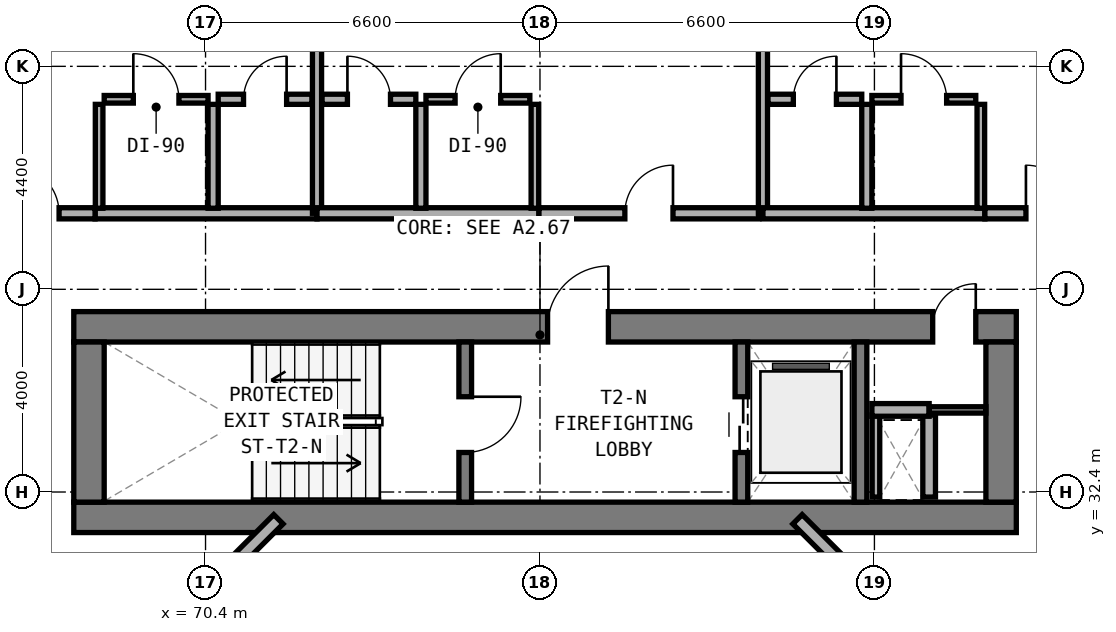
"""IFC4 building model, lengths in metres.
Left out: names, types, materials, properties, quantities, classifications, styles, units other than length and angle.
Written with IfcOpenShell. Run it as: python <this file> out.ifc"""

import sys

from ifc_helpers import new_model, si_unit, direction, frame, frame_2d, origin, place, context, subcontext, project, spatial, rectangle, extrude, element, fill, save


model = new_model("IFC4")
c1 = context("Model", 3, precision=1e-05, world=origin(), true_north=direction((0.0, 1.0)))
c2 = subcontext(c1, "Body", "Model", "MODEL_VIEW")
j1 = project(units=[si_unit("LENGTHUNIT", "METRE"), si_unit("PLANEANGLEUNIT", "RADIAN")], contexts=[c1])
p1 = place(None, origin())
s1 = spatial("IfcSite", under=j1, at=p1, CompositionType="ELEMENT")
p2 = place(p1, origin())
s2 = spatial("IfcBuilding", under=s1, at=p2, CompositionType="ELEMENT")
p3 = place(p2, frame((0.0, 0.0, 31.0)))
s3 = spatial("IfcBuildingStorey", under=s2, at=p3, CompositionType="ELEMENT", Elevation=31.0)
p4 = place(p3, frame((67.8, 31.9, 0.0), z_axis=(0.0, 0.0, 1.0), x_axis=(1.0, 0.0, 0.0)))
e1 = element("IfcWall", 1, at=p4, inside=s3, PredefinedType="SHEAR", context=c2, shape_type="SweptSolid", body=[
    extrude(rectangle(XDim=18.6, YDim=0.6, at=frame_2d((9.3, 0.0))), origin(), (0.0, 0.0, 1.0), 3.5),
])
p5 = place(p3, frame((67.8, 35.66, 0.0), z_axis=(0.0, 0.0, 1.0), x_axis=(1.0, 0.0, 0.0)))
e2 = element("IfcWall", 2, at=p5, inside=s3, PredefinedType="SHEAR", context=c2, shape_type="SweptSolid", body=[
    extrude(rectangle(XDim=18.6, YDim=0.6, at=frame_2d((9.3, 0.0))), origin(), (0.0, 0.0, 1.0), 3.5),
])
p6 = place(p5, frame((9.35, 0.0, 0.0)))
e3 = element("IfcOpeningElement", 3, at=p6, cuts=e2, PredefinedType="OPENING", context=c2, shape_type="SweptSolid", body=[
    extrude(rectangle(XDim=1.2, YDim=2.15, at=frame_2d((0.6, 1.075))), frame((0.0, 0.31, 0.0), z_axis=(0.0, -1.0, 0.0), x_axis=(1.0, 0.0, 0.0)), (0.0, 0.0, 1.0), 0.62),
])
p7 = place(p5, frame((16.95, 0.0, 0.0)))
e4 = element("IfcOpeningElement", 4, at=p7, cuts=e2, PredefinedType="OPENING", context=c2, shape_type="SweptSolid", body=[
    extrude(rectangle(XDim=0.85, YDim=2.1, at=frame_2d((0.425, 1.05))), frame((0.0, 0.31, 0.0), z_axis=(0.0, -1.0, 0.0), x_axis=(1.0, 0.0, 0.0)), (0.0, 0.0, 1.0), 0.62),
])
for number, where, z_axis, x_axis in (
    (5, (68.1, 32.2, 0.0), (0.0, 0.0, 1.0), (0.0, 1.0, 0.0)),
    (6, (86.1, 32.2, 0.0), (0.0, 0.0, 1.0), (0.0, 1.0, 0.0)),
):
    element("IfcWall", number, at=place(p3, frame(where, z_axis=z_axis, x_axis=x_axis)), inside=s3, PredefinedType="SHEAR", context=c2, shape_type="SweptSolid", body=[
        extrude(rectangle(XDim=3.16, YDim=0.6, at=frame_2d((1.58, 0.0))), origin(), (0.0, 0.0, 1.0), 3.5),
    ])
p8 = place(p3, frame((75.525, 32.2, 0.0), z_axis=(0.0, 0.0, 1.0), x_axis=(0.0, 1.0, 0.0)))
e7 = element("IfcWall", 7, at=p8, inside=s3, PredefinedType="STANDARD", context=c2, shape_type="SweptSolid", body=[
    extrude(rectangle(XDim=3.16, YDim=0.25, at=frame_2d((1.58, 0.0))), origin(), (0.0, 0.0, 1.0), 3.25),
])
p9 = place(p8, frame((0.98, 0.0, 0.0)))
e8 = element("IfcOpeningElement", 8, at=p9, cuts=e7, PredefinedType="OPENING", context=c2, shape_type="SweptSolid", body=[
    extrude(rectangle(XDim=1.1, YDim=2.15, at=frame_2d((0.55, 1.075))), frame((0.0, 0.135, 0.0), z_axis=(0.0, -1.0, 0.0), x_axis=(1.0, 0.0, 0.0)), (0.0, 0.0, 1.0), 0.27),
])
p10 = place(p3, frame((80.975, 32.2, 0.0), z_axis=(0.0, 0.0, 1.0), x_axis=(0.0, 1.0, 0.0)))
e9 = element("IfcWall", 9, at=p10, inside=s3, PredefinedType="STANDARD", context=c2, shape_type="SweptSolid", body=[
    extrude(rectangle(XDim=3.16, YDim=0.25, at=frame_2d((1.58, 0.0))), origin(), (0.0, 0.0, 1.0), 3.25),
])
p11 = place(p10, frame((0.98, 0.0, 0.0)))
e10 = element("IfcOpeningElement", 10, at=p11, cuts=e9, PredefinedType="OPENING", context=c2, shape_type="SweptSolid", body=[
    extrude(rectangle(XDim=1.1, YDim=2.15, at=frame_2d((0.55, 1.075))), frame((0.0, 0.135, 0.0), z_axis=(0.0, -1.0, 0.0), x_axis=(1.0, 0.0, 0.0)), (0.0, 0.0, 1.0), 0.27),
])
p12 = place(p3, frame((83.325, 32.2, 0.0), z_axis=(0.0, 0.0, 1.0), x_axis=(0.0, 1.0, 0.0)))
e11 = element("IfcWall", 11, at=p12, inside=s3, PredefinedType="STANDARD", context=c2, shape_type="SweptSolid", body=[
    extrude(rectangle(XDim=3.16, YDim=0.25, at=frame_2d((1.58, 0.0))), origin(), (0.0, 0.0, 1.0), 3.25),
])
for number, where, z_axis, x_axis in (
    (12, (83.716, 30.228, 0.0), (0.0, 0.0, 1.0), (-0.707, 0.707, 0.0)),
    (13, (71.838, 31.862, 0.0), (0.0, 0.0, 1.0), (-0.707, -0.707, 0.0)),
):
    element("IfcWall", number, at=place(p3, frame(where, z_axis=z_axis, x_axis=x_axis)), inside=s3, PredefinedType="STANDARD", context=c2, shape_type="SweptSolid", body=[
        extrude(rectangle(XDim=2.311, YDim=0.26, at=frame_2d((1.155, 0.0))), origin(), (0.0, 0.0, 1.0), 3.25),
    ])
p13 = place(p3, frame((83.63, 32.3, 0.0), z_axis=(0.0, 0.0, 1.0), x_axis=(0.0, 1.0, 0.0)))
e14 = element("IfcWall", 14, at=p13, inside=s3, PredefinedType="PARTITIONING", context=c2, shape_type="SweptSolid", body=[
    extrude(rectangle(XDim=1.62, YDim=0.15, at=frame_2d((0.81, 0.0))), origin(), (0.0, 0.0, 1.0), 2.725),
])
p14 = place(p3, frame((84.68, 32.3, 0.0), z_axis=(0.0, 0.0, 1.0), x_axis=(0.0, 1.0, 0.0)))
e15 = element("IfcWall", 15, at=p14, inside=s3, PredefinedType="SOLIDWALL", context=c2, shape_type="SweptSolid", body=[
    extrude(rectangle(XDim=1.62, YDim=0.25, at=frame_2d((0.81, 0.0))), origin(), (0.0, 0.0, 1.0), 3.22),
])
p15 = place(p3, frame((83.55, 34.02, 0.0), z_axis=(0.0, 0.0, 1.0), x_axis=(1.0, 0.0, 0.0)))
e16 = element("IfcWall", 16, at=p15, inside=s3, PredefinedType="SOLIDWALL", context=c2, shape_type="SweptSolid", body=[
    extrude(rectangle(XDim=1.13, YDim=0.25, at=frame_2d((0.565, 0.0))), origin(), (0.0, 0.0, 1.0), 3.22),
])
p16 = place(p3, frame((84.68, 34.02, 0.0), z_axis=(0.0, 0.0, 1.0), x_axis=(1.0, 0.0, 0.0)))
e17 = element("IfcWall", 17, at=p16, inside=s3, PredefinedType="PARTITIONING", context=c2, shape_type="SweptSolid", body=[
    extrude(rectangle(XDim=1.12, YDim=0.125, at=frame_2d((0.56, 0.0))), origin(), (0.0, 0.0, 1.0), 3.22),
])
p17 = place(p3, frame((68.22, 37.9, 0.0), z_axis=(0.0, 0.0, 1.0), x_axis=(1.0, 0.0, 0.0)))
e18 = element("IfcWall", 18, at=p17, inside=s3, PredefinedType="SOLIDWALL", context=c2, shape_type="SweptSolid", body=[
    extrude(rectangle(XDim=4.38, YDim=0.22, at=frame_2d((2.19, 0.0))), origin(), (0.0, 0.0, 1.0), 2.725),
])
p18 = place(p3, frame((65.85, 37.9, 0.0), z_axis=(0.0, 0.0, 1.0), x_axis=(1.0, 0.0, 0.0)))
e19 = element("IfcWall", 19, at=p18, inside=s3, PredefinedType="SOLIDWALL", context=c2, shape_type="SweptSolid", body=[
    extrude(rectangle(XDim=2.37, YDim=0.22, at=frame_2d((1.185, 0.0))), origin(), (0.0, 0.0, 1.0), 3.22),
])
p19 = place(p18, frame((0.71, 0.0, 0.0)))
e20 = element("IfcOpeningElement", 20, at=p19, cuts=e19, PredefinedType="OPENING", context=c2, shape_type="SweptSolid", body=[
    extrude(rectangle(XDim=0.95, YDim=2.1, at=frame_2d((0.475, 1.05))), frame((0.0, 0.12, 0.0), z_axis=(0.0, -1.0, 0.0), x_axis=(1.0, 0.0, 0.0)), (0.0, 0.0, 1.0), 0.24),
])
p20 = place(p3, frame((70.55, 38.0, 0.0), z_axis=(0.0, 0.0, 1.0), x_axis=(0.0, 1.0, 0.0)))
e21 = element("IfcWall", 21, at=p20, inside=s3, PredefinedType="PLUMBINGWALL", context=c2, shape_type="SweptSolid", body=[
    extrude(rectangle(XDim=2.05, YDim=0.2, at=frame_2d((1.025, 0.0))), origin(), (0.0, 0.0, 1.0), 3.22),
])
p21 = place(p3, frame((68.3, 38.0, 0.0), z_axis=(0.0, 0.0, 1.0), x_axis=(0.0, 1.0, 0.0)))
e22 = element("IfcWall", 22, at=p21, inside=s3, PredefinedType="PARTITIONING", context=c2, shape_type="SweptSolid", body=[
    extrude(rectangle(XDim=2.05, YDim=0.15, at=frame_2d((1.025, 0.0))), origin(), (0.0, 0.0, 1.0), 3.22),
])
p22 = place(p3, frame((70.65, 40.15, 0.0), z_axis=(0.0, 0.0, 1.0), x_axis=(1.0, 0.0, 0.0)))
e23 = element("IfcWall", 23, at=p22, inside=s3, PredefinedType="PLUMBINGWALL", context=c2, shape_type="SweptSolid", body=[
    extrude(rectangle(XDim=1.85, YDim=0.2, at=frame_2d((0.925, 0.0))), origin(), (0.0, 0.0, 1.0), 3.22),
])
p23 = place(p22, frame((0.5, 0.0, 0.0)))
e24 = element("IfcOpeningElement", 24, at=p23, cuts=e23, PredefinedType="OPENING", context=c2, shape_type="SweptSolid", body=[
    extrude(rectangle(XDim=0.85, YDim=2.1, at=frame_2d((0.425, 1.05))), frame((0.0, 0.11, 0.0), z_axis=(0.0, -1.0, 0.0), x_axis=(1.0, 0.0, 0.0)), (0.0, 0.0, 1.0), 0.22),
])
p24 = place(p3, frame((68.4, 40.15, 0.0), z_axis=(0.0, 0.0, 1.0), x_axis=(1.0, 0.0, 0.0)))
e25 = element("IfcWall", 25, at=p24, inside=s3, PredefinedType="PARTITIONING", context=c2, shape_type="SweptSolid", body=[
    extrude(rectangle(XDim=2.05, YDim=0.15, at=frame_2d((1.025, 0.0))), origin(), (0.0, 0.0, 1.0), 3.22),
])
p25 = place(p24, frame((0.575, 0.0, 0.0)))
e26 = element("IfcOpeningElement", 26, at=p25, cuts=e25, PredefinedType="OPENING", context=c2, shape_type="SweptSolid", body=[
    extrude(rectangle(XDim=0.9, YDim=2.1, at=frame_2d((0.45, 1.05))), frame((0.0, 0.085, 0.0), z_axis=(0.0, -1.0, 0.0), x_axis=(1.0, 0.0, 0.0)), (0.0, 0.0, 1.0), 0.17),
])
p26 = place(p3, frame((72.6, 37.9, 0.0), z_axis=(0.0, 0.0, 1.0), x_axis=(0.0, 1.0, 0.0)))
e27 = element("IfcWall", 27, at=p26, inside=s3, PredefinedType="SOLIDWALL", context=c2, shape_type="SweptSolid", body=[
    extrude(rectangle(XDim=7.04, YDim=0.18, at=frame_2d((3.52, 0.0))), origin(), (0.0, 0.0, 1.0), 2.725),
])
p27 = place(p3, frame((72.6, 37.9, 0.0), z_axis=(0.0, 0.0, 1.0), x_axis=(1.0, 0.0, 0.0)))
e28 = element("IfcWall", 28, at=p27, inside=s3, PredefinedType="SOLIDWALL", context=c2, shape_type="SweptSolid", body=[
    extrude(rectangle(XDim=4.38, YDim=0.22, at=frame_2d((2.19, 0.0))), origin(), (0.0, 0.0, 1.0), 2.725),
])
p28 = place(p3, frame((76.98, 37.9, 0.0), z_axis=(0.0, 0.0, 1.0), x_axis=(1.0, 0.0, 0.0)))
e29 = element("IfcWall", 29, at=p28, inside=s3, PredefinedType="SOLIDWALL", context=c2, shape_type="SweptSolid", body=[
    extrude(rectangle(XDim=4.34, YDim=0.22, at=frame_2d((2.17, 0.0))), origin(), (0.0, 0.0, 1.0), 2.725),
])
p29 = place(p28, frame((1.695, 0.0, 0.0)))
e30 = element("IfcOpeningElement", 30, at=p29, cuts=e29, PredefinedType="OPENING", context=c2, shape_type="SweptSolid", body=[
    extrude(rectangle(XDim=0.95, YDim=2.1, at=frame_2d((0.475, 1.05))), frame((0.0, 0.12, 0.0), z_axis=(0.0, -1.0, 0.0), x_axis=(1.0, 0.0, 0.0)), (0.0, 0.0, 1.0), 0.24),
])
p30 = place(p3, frame((74.65, 38.0, 0.0), z_axis=(0.0, 0.0, 1.0), x_axis=(0.0, 1.0, 0.0)))
e31 = element("IfcWall", 31, at=p30, inside=s3, PredefinedType="PLUMBINGWALL", context=c2, shape_type="SweptSolid", body=[
    extrude(rectangle(XDim=2.05, YDim=0.2, at=frame_2d((1.025, 0.0))), origin(), (0.0, 0.0, 1.0), 2.825),
])
p31 = place(p3, frame((76.9, 38.0, 0.0), z_axis=(0.0, 0.0, 1.0), x_axis=(0.0, 1.0, 0.0)))
e32 = element("IfcWall", 32, at=p31, inside=s3, PredefinedType="PARTITIONING", context=c2, shape_type="SweptSolid", body=[
    extrude(rectangle(XDim=2.05, YDim=0.15, at=frame_2d((1.025, 0.0))), origin(), (0.0, 0.0, 1.0), 2.825),
])
p32 = place(p3, frame((72.7, 40.15, 0.0), z_axis=(0.0, 0.0, 1.0), x_axis=(1.0, 0.0, 0.0)))
e33 = element("IfcWall", 33, at=p32, inside=s3, PredefinedType="PLUMBINGWALL", context=c2, shape_type="SweptSolid", body=[
    extrude(rectangle(XDim=1.85, YDim=0.2, at=frame_2d((0.925, 0.0))), origin(), (0.0, 0.0, 1.0), 3.22),
])
p33 = place(p32, frame((0.5, 0.0, 0.0)))
e34 = element("IfcOpeningElement", 34, at=p33, cuts=e33, PredefinedType="OPENING", context=c2, shape_type="SweptSolid", body=[
    extrude(rectangle(XDim=0.85, YDim=2.1, at=frame_2d((0.425, 1.05))), frame((0.0, 0.11, 0.0), z_axis=(0.0, -1.0, 0.0), x_axis=(1.0, 0.0, 0.0)), (0.0, 0.0, 1.0), 0.22),
])
p34 = place(p3, frame((74.75, 40.15, 0.0), z_axis=(0.0, 0.0, 1.0), x_axis=(1.0, 0.0, 0.0)))
e35 = element("IfcWall", 35, at=p34, inside=s3, PredefinedType="PARTITIONING", context=c2, shape_type="SweptSolid", body=[
    extrude(rectangle(XDim=2.05, YDim=0.15, at=frame_2d((1.025, 0.0))), origin(), (0.0, 0.0, 1.0), 3.22),
])
p35 = place(p34, frame((0.575, 0.0, 0.0)))
e36 = element("IfcOpeningElement", 36, at=p35, cuts=e35, PredefinedType="OPENING", context=c2, shape_type="SweptSolid", body=[
    extrude(rectangle(XDim=0.9, YDim=2.1, at=frame_2d((0.45, 1.05))), frame((0.0, 0.085, 0.0), z_axis=(0.0, -1.0, 0.0), x_axis=(1.0, 0.0, 0.0)), (0.0, 0.0, 1.0), 0.17),
])
p36 = place(p3, frame((81.4, 37.9, 0.0), z_axis=(0.0, 0.0, 1.0), x_axis=(0.0, 1.0, 0.0)))
e37 = element("IfcWall", 37, at=p36, inside=s3, PredefinedType="SOLIDWALL", context=c2, shape_type="SweptSolid", body=[
    extrude(rectangle(XDim=7.04, YDim=0.18, at=frame_2d((3.52, 0.0))), origin(), (0.0, 0.0, 1.0), 2.725),
])
p37 = place(p3, frame((81.4, 37.9, 0.0), z_axis=(0.0, 0.0, 1.0), x_axis=(1.0, 0.0, 0.0)))
e38 = element("IfcWall", 38, at=p37, inside=s3, PredefinedType="SOLIDWALL", context=c2, shape_type="SweptSolid", body=[
    extrude(rectangle(XDim=4.38, YDim=0.22, at=frame_2d((2.19, 0.0))), origin(), (0.0, 0.0, 1.0), 2.725),
])
p38 = place(p3, frame((85.78, 37.9, 0.0), z_axis=(0.0, 0.0, 1.0), x_axis=(1.0, 0.0, 0.0)))
e39 = element("IfcWall", 39, at=p38, inside=s3, PredefinedType="SOLIDWALL", context=c2, shape_type="SweptSolid", body=[
    extrude(rectangle(XDim=2.57, YDim=0.22, at=frame_2d((1.285, 0.0))), origin(), (0.0, 0.0, 1.0), 3.22),
])
p39 = place(p38, frame((0.81, 0.0, 0.0)))
e40 = element("IfcOpeningElement", 40, at=p39, cuts=e39, PredefinedType="OPENING", context=c2, shape_type="SweptSolid", body=[
    extrude(rectangle(XDim=0.95, YDim=2.1, at=frame_2d((0.475, 1.05))), frame((0.0, 0.12, 0.0), z_axis=(0.0, -1.0, 0.0), x_axis=(1.0, 0.0, 0.0)), (0.0, 0.0, 1.0), 0.24),
])
p40 = place(p3, frame((83.45, 38.0, 0.0), z_axis=(0.0, 0.0, 1.0), x_axis=(0.0, 1.0, 0.0)))
e41 = element("IfcWall", 41, at=p40, inside=s3, PredefinedType="PLUMBINGWALL", context=c2, shape_type="SweptSolid", body=[
    extrude(rectangle(XDim=2.05, YDim=0.2, at=frame_2d((1.025, 0.0))), origin(), (0.0, 0.0, 1.0), 3.22),
])
p41 = place(p3, frame((85.7, 38.0, 0.0), z_axis=(0.0, 0.0, 1.0), x_axis=(0.0, 1.0, 0.0)))
e42 = element("IfcWall", 42, at=p41, inside=s3, PredefinedType="PARTITIONING", context=c2, shape_type="SweptSolid", body=[
    extrude(rectangle(XDim=2.05, YDim=0.15, at=frame_2d((1.025, 0.0))), origin(), (0.0, 0.0, 1.0), 3.22),
])
p42 = place(p3, frame((81.5, 40.15, 0.0), z_axis=(0.0, 0.0, 1.0), x_axis=(1.0, 0.0, 0.0)))
e43 = element("IfcWall", 43, at=p42, inside=s3, PredefinedType="PLUMBINGWALL", context=c2, shape_type="SweptSolid", body=[
    extrude(rectangle(XDim=1.85, YDim=0.2, at=frame_2d((0.925, 0.0))), origin(), (0.0, 0.0, 1.0), 2.725),
])
p43 = place(p42, frame((0.5, 0.0, 0.0)))
e44 = element("IfcOpeningElement", 44, at=p43, cuts=e43, PredefinedType="OPENING", context=c2, shape_type="SweptSolid", body=[
    extrude(rectangle(XDim=0.85, YDim=2.1, at=frame_2d((0.425, 1.05))), frame((0.0, 0.11, 0.0), z_axis=(0.0, -1.0, 0.0), x_axis=(1.0, 0.0, 0.0)), (0.0, 0.0, 1.0), 0.22),
])
p44 = place(p3, frame((83.55, 40.15, 0.0), z_axis=(0.0, 0.0, 1.0), x_axis=(1.0, 0.0, 0.0)))
e45 = element("IfcWall", 45, at=p44, inside=s3, PredefinedType="PARTITIONING", context=c2, shape_type="SweptSolid", body=[
    extrude(rectangle(XDim=2.05, YDim=0.15, at=frame_2d((1.025, 0.0))), origin(), (0.0, 0.0, 1.0), 3.22),
])
p45 = place(p44, frame((0.575, 0.0, 0.0)))
e46 = element("IfcOpeningElement", 46, at=p45, cuts=e45, PredefinedType="OPENING", context=c2, shape_type="SweptSolid", body=[
    extrude(rectangle(XDim=0.9, YDim=2.1, at=frame_2d((0.45, 1.05))), frame((0.0, 0.085, 0.0), z_axis=(0.0, -1.0, 0.0), x_axis=(1.0, 0.0, 0.0)), (0.0, 0.0, 1.0), 0.17),
])
p46 = place(p9, frame((1.1, 0.0, 0.0), z_axis=(0.0, 0.0, 1.0), x_axis=(-1.0, 0.0, 0.0)))
e47 = element("IfcDoor", 47, at=p46, inside=s3, OperationType="SINGLE_SWING_LEFT", PredefinedType="DOOR", context=c2, shape_type="SweptSolid", body=[
    extrude(rectangle(XDim=1.1, YDim=2.15, at=frame_2d((0.55, 1.075))), frame((0.0, 0.025, 0.0), z_axis=(0.0, -1.0, 0.0), x_axis=(1.0, 0.0, 0.0)), (0.0, 0.0, 1.0), 0.05),
])
fill(e8, e47)
p47 = place(p6, origin())
e48 = element("IfcDoor", 48, at=p47, inside=s3, OperationType="SINGLE_SWING_RIGHT", PredefinedType="DOOR", context=c2, shape_type="SweptSolid", body=[
    extrude(rectangle(XDim=1.2, YDim=2.15, at=frame_2d((0.6, 1.075))), frame((0.0, 0.025, 0.0), z_axis=(0.0, -1.0, 0.0), x_axis=(1.0, 0.0, 0.0)), (0.0, 0.0, 1.0), 0.05),
])
fill(e3, e48)
p48 = place(p11, origin())
e49 = element("IfcDoor", 49, at=p48, inside=s3, OperationType="DOUBLE_DOOR_SLIDING", PredefinedType="DOOR", context=c2, shape_type="SweptSolid", body=[
    extrude(rectangle(XDim=1.1, YDim=2.15, at=frame_2d((0.55, 1.075))), frame((0.0, 0.025, 0.0), z_axis=(0.0, -1.0, 0.0), x_axis=(1.0, 0.0, 0.0)), (0.0, 0.0, 1.0), 0.05),
])
fill(e10, e49)
p49 = place(p7, origin())
e50 = element("IfcDoor", 50, at=p49, inside=s3, OperationType="SINGLE_SWING_RIGHT", PredefinedType="DOOR", context=c2, shape_type="SweptSolid", body=[
    extrude(rectangle(XDim=0.85, YDim=2.1, at=frame_2d((0.425, 1.05))), frame((0.0, 0.025, 0.0), z_axis=(0.0, -1.0, 0.0), x_axis=(1.0, 0.0, 0.0)), (0.0, 0.0, 1.0), 0.05),
])
fill(e4, e50)
p50 = place(p19, origin())
e51 = element("IfcDoor", 51, at=p50, inside=s3, OperationType="SINGLE_SWING_LEFT", PredefinedType="DOOR", context=c2, shape_type="SweptSolid", body=[
    extrude(rectangle(XDim=0.95, YDim=2.1, at=frame_2d((0.475, 1.05))), frame((0.0, 0.025, 0.0), z_axis=(0.0, -1.0, 0.0), x_axis=(1.0, 0.0, 0.0)), (0.0, 0.0, 1.0), 0.05),
])
fill(e20, e51)
p51 = place(p23, origin())
e52 = element("IfcDoor", 52, at=p51, inside=s3, OperationType="SINGLE_SWING_RIGHT", PredefinedType="DOOR", context=c2, shape_type="SweptSolid", body=[
    extrude(rectangle(XDim=0.85, YDim=2.1, at=frame_2d((0.425, 1.05))), frame((0.0, 0.025, 0.0), z_axis=(0.0, -1.0, 0.0), x_axis=(1.0, 0.0, 0.0)), (0.0, 0.0, 1.0), 0.05),
])
fill(e24, e52)
p52 = place(p25, origin())
e53 = element("IfcDoor", 53, at=p52, inside=s3, OperationType="SINGLE_SWING_LEFT", PredefinedType="DOOR", context=c2, shape_type="SweptSolid", body=[
    extrude(rectangle(XDim=0.9, YDim=2.1, at=frame_2d((0.45, 1.05))), frame((0.0, 0.025, 0.0), z_axis=(0.0, -1.0, 0.0), x_axis=(1.0, 0.0, 0.0)), (0.0, 0.0, 1.0), 0.05),
])
fill(e26, e53)
p53 = place(p29, origin())
e54 = element("IfcDoor", 54, at=p53, inside=s3, OperationType="SINGLE_SWING_RIGHT", PredefinedType="DOOR", context=c2, shape_type="SweptSolid", body=[
    extrude(rectangle(XDim=0.95, YDim=2.1, at=frame_2d((0.475, 1.05))), frame((0.0, 0.025, 0.0), z_axis=(0.0, -1.0, 0.0), x_axis=(1.0, 0.0, 0.0)), (0.0, 0.0, 1.0), 0.05),
])
fill(e30, e54)
p54 = place(p33, origin())
e55 = element("IfcDoor", 55, at=p54, inside=s3, OperationType="SINGLE_SWING_LEFT", PredefinedType="DOOR", context=c2, shape_type="SweptSolid", body=[
    extrude(rectangle(XDim=0.85, YDim=2.1, at=frame_2d((0.425, 1.05))), frame((0.0, 0.025, 0.0), z_axis=(0.0, -1.0, 0.0), x_axis=(1.0, 0.0, 0.0)), (0.0, 0.0, 1.0), 0.05),
])
fill(e34, e55)
p55 = place(p35, origin())
e56 = element("IfcDoor", 56, at=p55, inside=s3, OperationType="SINGLE_SWING_RIGHT", PredefinedType="DOOR", context=c2, shape_type="SweptSolid", body=[
    extrude(rectangle(XDim=0.9, YDim=2.1, at=frame_2d((0.45, 1.05))), frame((0.0, 0.025, 0.0), z_axis=(0.0, -1.0, 0.0), x_axis=(1.0, 0.0, 0.0)), (0.0, 0.0, 1.0), 0.05),
])
fill(e36, e56)
p56 = place(p39, origin())
e57 = element("IfcDoor", 57, at=p56, inside=s3, OperationType="SINGLE_SWING_LEFT", PredefinedType="DOOR", context=c2, shape_type="SweptSolid", body=[
    extrude(rectangle(XDim=0.95, YDim=2.1, at=frame_2d((0.475, 1.05))), frame((0.0, 0.025, 0.0), z_axis=(0.0, -1.0, 0.0), x_axis=(1.0, 0.0, 0.0)), (0.0, 0.0, 1.0), 0.05),
])
fill(e40, e57)
p57 = place(p43, origin())
e58 = element("IfcDoor", 58, at=p57, inside=s3, OperationType="SINGLE_SWING_RIGHT", PredefinedType="DOOR", context=c2, shape_type="SweptSolid", body=[
    extrude(rectangle(XDim=0.85, YDim=2.1, at=frame_2d((0.425, 1.05))), frame((0.0, 0.025, 0.0), z_axis=(0.0, -1.0, 0.0), x_axis=(1.0, 0.0, 0.0)), (0.0, 0.0, 1.0), 0.05),
])
fill(e44, e58)
p58 = place(p45, origin())
e59 = element("IfcDoor", 59, at=p58, inside=s3, OperationType="SINGLE_SWING_LEFT", PredefinedType="DOOR", context=c2, shape_type="SweptSolid", body=[
    extrude(rectangle(XDim=0.9, YDim=2.1, at=frame_2d((0.45, 1.05))), frame((0.0, 0.025, 0.0), z_axis=(0.0, -1.0, 0.0), x_axis=(1.0, 0.0, 0.0)), (0.0, 0.0, 1.0), 0.05),
])
fill(e46, e59)
save(model, sys.argv[1])
